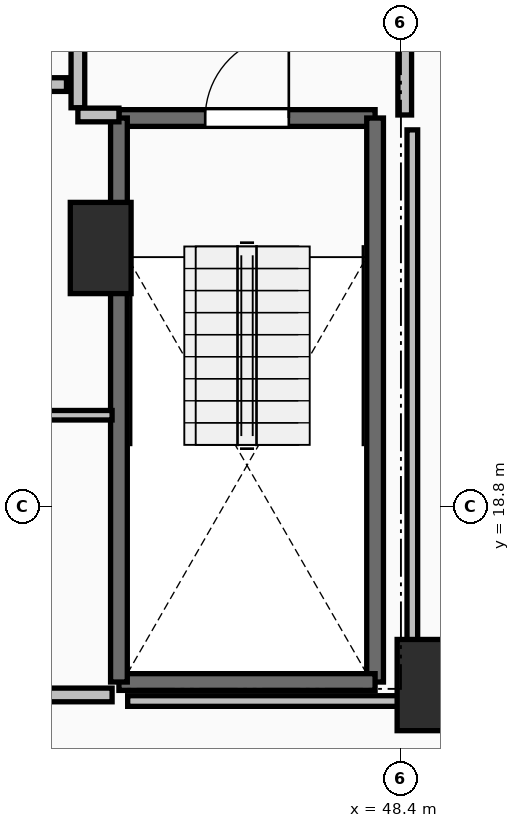
"""IFC4 building model, lengths in metres.
Left out: names, types, materials, properties, quantities, classifications, styles, units other than length and angle.
Written with IfcOpenShell. Run it as: python <this file> out.ifc"""

import sys

from ifc_helpers import new_model, si_unit, direction, frame, frame_2d, origin, origin_2d, place, context, subcontext, project, spatial, rectangle, extrude, element, fill, save


model = new_model("IFC4")
c1 = context("Model", 3, precision=1e-05, world=origin(), true_north=direction((0.0, 1.0)))
c2 = subcontext(c1, "Body", "Model", "MODEL_VIEW")
j1 = project(units=[si_unit("LENGTHUNIT", "METRE"), si_unit("PLANEANGLEUNIT", "RADIAN")], contexts=[c1])
p1 = place(None, origin())
s1 = spatial("IfcSite", under=j1, at=p1, CompositionType="ELEMENT")
p2 = place(p1, origin())
s2 = spatial("IfcBuilding", under=s1, at=p2, CompositionType="ELEMENT")
p3 = place(p2, frame((0.0, 0.0, 96.3)))
s3 = spatial("IfcBuildingStorey", under=s2, at=p3, CompositionType="ELEMENT", Elevation=96.3)
for number, where, z_axis, x_axis in (
    (1, (48.75, 16.45, 0.0), (0.0, 0.0, 1.0), (1.0, 0.0, 0.0)),
    (2, (44.45, 22.2, 0.0), (0.0, 0.0, 1.0), (1.0, 0.0, 0.0)),
):
    element("IfcColumn", number, at=place(p3, frame(where, z_axis=z_axis, x_axis=x_axis)), inside=s3, PredefinedType="PILASTER", context=c2, shape_type="SweptSolid", body=[
        extrude(rectangle(XDim=0.8, YDim=1.2, at=origin_2d()), origin(), (0.0, 0.0, 1.0), 3.5),
    ])
p4 = place(p3, frame((44.69, 23.91, 0.0), z_axis=(0.0, 0.0, 1.0), x_axis=(1.0, 0.0, 0.0)))
e3 = element("IfcWall", 3, at=p4, inside=s3, PredefinedType="SOLIDWALL", context=c2, shape_type="SweptSolid", body=[
    extrude(rectangle(XDim=3.37, YDim=0.22, at=frame_2d((1.685, 0.0))), origin(), (0.0, 0.0, 1.0), 3.24),
])
p5 = place(p4, frame((1.135, 0.0, 0.0)))
e4 = element("IfcOpeningElement", 4, at=p5, cuts=e3, PredefinedType="OPENING", context=c2, shape_type="SweptSolid", body=[
    extrude(rectangle(XDim=1.1, YDim=2.15, at=frame_2d((0.55, 1.075))), frame((0.0, 0.125, 0.0), z_axis=(0.0, -1.0, 0.0), x_axis=(1.0, 0.0, 0.0)), (0.0, 0.0, 1.0), 0.25),
])
p6 = place(p3, frame((48.06, 23.91, 0.0), z_axis=(0.0, 0.0, 1.0), x_axis=(0.0, -1.0, 0.0)))
e5 = element("IfcWall", 5, at=p6, inside=s3, PredefinedType="SOLIDWALL", context=c2, shape_type="SweptSolid", body=[
    extrude(rectangle(XDim=7.42, YDim=0.22, at=frame_2d((3.71, 0.0))), origin(), (0.0, 0.0, 1.0), 3.24),
])
p7 = place(p3, frame((48.06, 16.49, 0.0), z_axis=(0.0, 0.0, 1.0), x_axis=(-1.0, 0.0, 0.0)))
e6 = element("IfcWall", 6, at=p7, inside=s3, PredefinedType="SOLIDWALL", context=c2, shape_type="SweptSolid", body=[
    extrude(rectangle(XDim=3.37, YDim=0.22, at=frame_2d((1.685, 0.0))), origin(), (0.0, 0.0, 1.0), 3.24),
])
p8 = place(p3, frame((44.69, 16.49, 0.0), z_axis=(0.0, 0.0, 1.0), x_axis=(0.0, 1.0, 0.0)))
e7 = element("IfcWall", 7, at=p8, inside=s3, PredefinedType="SOLIDWALL", context=c2, shape_type="SweptSolid", body=[
    extrude(rectangle(XDim=7.42, YDim=0.22, at=frame_2d((3.71, 0.0))), origin(), (0.0, 0.0, 1.0), 3.24),
])
p9 = place(p3, frame((44.15, 27.955, 0.0), z_axis=(0.0, 0.0, 1.0), x_axis=(0.0, -1.0, 0.0)))
e8 = element("IfcWall", 8, at=p9, inside=s3, PredefinedType="PARTITIONING", context=c2, shape_type="SweptSolid", body=[
    extrude(rectangle(XDim=3.91, YDim=0.18, at=frame_2d((1.955, 0.0))), origin(), (0.0, 0.0, 1.0), 3.24),
])
p10 = place(p9, frame((1.355, 0.0, 0.0)))
e9 = element("IfcOpeningElement", 9, at=p10, cuts=e8, PredefinedType="OPENING", context=c2, shape_type="SweptSolid", body=[
    extrude(rectangle(XDim=1.2, YDim=2.15, at=frame_2d((0.6, 1.075))), frame((0.0, 0.105, 0.0), z_axis=(0.0, -1.0, 0.0), x_axis=(1.0, 0.0, 0.0)), (0.0, 0.0, 1.0), 0.21),
])
p11 = place(p3, frame((44.15, 23.95, 0.0), z_axis=(0.0, 0.0, 1.0), x_axis=(1.0, 0.0, 0.0)))
e10 = element("IfcWall", 10, at=p11, inside=s3, PredefinedType="PARTITIONING", context=c2, shape_type="SweptSolid", body=[
    extrude(rectangle(XDim=0.54, YDim=0.18, at=frame_2d((0.27, 0.0))), origin(), (0.0, 0.0, 1.0), 3.24),
])
p12 = place(p3, frame((48.45, 23.95, 0.0), z_axis=(0.0, 0.0, 1.0), x_axis=(0.0, 1.0, 0.0)))
e11 = element("IfcWall", 11, at=p12, inside=s3, PredefinedType="PARTITIONING", context=c2, shape_type="SweptSolid", body=[
    extrude(rectangle(XDim=4.05, YDim=0.18, at=frame_2d((2.025, 0.0))), origin(), (0.0, 0.0, 1.0), 3.24),
])
p13 = place(p12, frame((1.425, 0.0, 0.0)))
e12 = element("IfcOpeningElement", 12, at=p13, cuts=e11, PredefinedType="OPENING", context=c2, shape_type="SweptSolid", body=[
    extrude(rectangle(XDim=1.2, YDim=2.15, at=frame_2d((0.6, 1.075))), frame((0.0, 0.105, 0.0), z_axis=(0.0, -1.0, 0.0), x_axis=(1.0, 0.0, 0.0)), (0.0, 0.0, 1.0), 0.21),
])
p14 = place(p3, frame((41.555, 24.35, 0.0), z_axis=(0.0, 0.0, 1.0), x_axis=(1.0, 0.0, 0.0)))
e13 = element("IfcWall", 13, at=p14, inside=s3, PredefinedType="PARTITIONING", context=c2, shape_type="SweptSolid", body=[
    extrude(rectangle(XDim=2.445, YDim=0.18, at=frame_2d((1.223, 0.0))), origin(), (0.0, 0.0, 1.0), 3.24),
])
p15 = place(p14, frame((0.798, 0.0, 0.0)))
e14 = element("IfcOpeningElement", 14, at=p15, cuts=e13, PredefinedType="OPENING", context=c2, shape_type="SweptSolid", body=[
    extrude(rectangle(XDim=0.85, YDim=2.1, at=frame_2d((0.425, 1.05))), frame((0.0, 0.105, 0.0), z_axis=(0.0, -1.0, 0.0), x_axis=(1.0, 0.0, 0.0)), (0.0, 0.0, 1.0), 0.21),
])
p16 = place(p3, frame((44.6, 20.0, 0.0), z_axis=(0.0, 0.0, 1.0), x_axis=(-1.0, 0.0, 0.0)))
e15 = element("IfcWall", 15, at=p16, inside=s3, PredefinedType="PARTITIONING", context=c2, shape_type="SweptSolid", body=[
    extrude(rectangle(XDim=3.2, YDim=0.125, at=frame_2d((1.6, 0.0))), origin(), (0.0, 0.0, 1.0), 3.24),
])
p17 = place(p3, frame((41.4, 16.32, 0.0), z_axis=(0.0, 0.0, 1.0), x_axis=(1.0, 0.0, 0.0)))
e16 = element("IfcWall", 16, at=p17, inside=s3, PredefinedType="PARTITIONING", context=c2, shape_type="SweptSolid", body=[
    extrude(rectangle(XDim=3.2, YDim=0.18, at=frame_2d((1.6, 0.0))), origin(), (0.0, 0.0, 1.0), 3.24),
])
p18 = place(p17, frame((1.2, 0.0, 0.0)))
e17 = element("IfcOpeningElement", 17, at=p18, cuts=e16, PredefinedType="OPENING", context=c2, shape_type="SweptSolid", body=[
    extrude(rectangle(XDim=0.8, YDim=2.05, at=frame_2d((0.4, 1.025))), frame((0.0, 0.105, 0.0), z_axis=(0.0, -1.0, 0.0), x_axis=(1.0, 0.0, 0.0)), (0.0, 0.0, 1.0), 0.21),
])
p19 = place(p3, frame((48.55, 23.754, 0.0), z_axis=(0.0, 0.0, 1.0), x_axis=(0.0, -1.0, 0.0)))
e18 = element("IfcWall", 18, at=p19, inside=s3, PredefinedType="PARTITIONING", context=c2, shape_type="SweptSolid", body=[
    extrude(rectangle(XDim=7.514, YDim=0.14, at=frame_2d((3.757, 0.0))), origin(), (0.0, 0.0, 1.0), 2.432),
])
p20 = place(p3, frame((48.55, 16.24, 0.0), z_axis=(0.0, 0.0, 1.0), x_axis=(-1.0, 0.0, 0.0)))
e19 = element("IfcWall", 19, at=p20, inside=s3, PredefinedType="PARTITIONING", context=c2, shape_type="SweptSolid", body=[
    extrude(rectangle(XDim=3.745, YDim=0.14, at=frame_2d((1.873, 0.0))), origin(), (0.0, 0.0, 1.0), 2.432),
])
p21 = place(p5, origin())
e20 = element("IfcDoor", 20, at=p21, inside=s3, OperationType="SINGLE_SWING_RIGHT", PredefinedType="DOOR", context=c2, shape_type="SweptSolid", body=[
    extrude(rectangle(XDim=1.1, YDim=2.15, at=frame_2d((0.55, 1.075))), frame((0.0, 0.025, 0.0), z_axis=(0.0, -1.0, 0.0), x_axis=(1.0, 0.0, 0.0)), (0.0, 0.0, 1.0), 0.05),
])
fill(e4, e20)
save(model, sys.argv[1])
